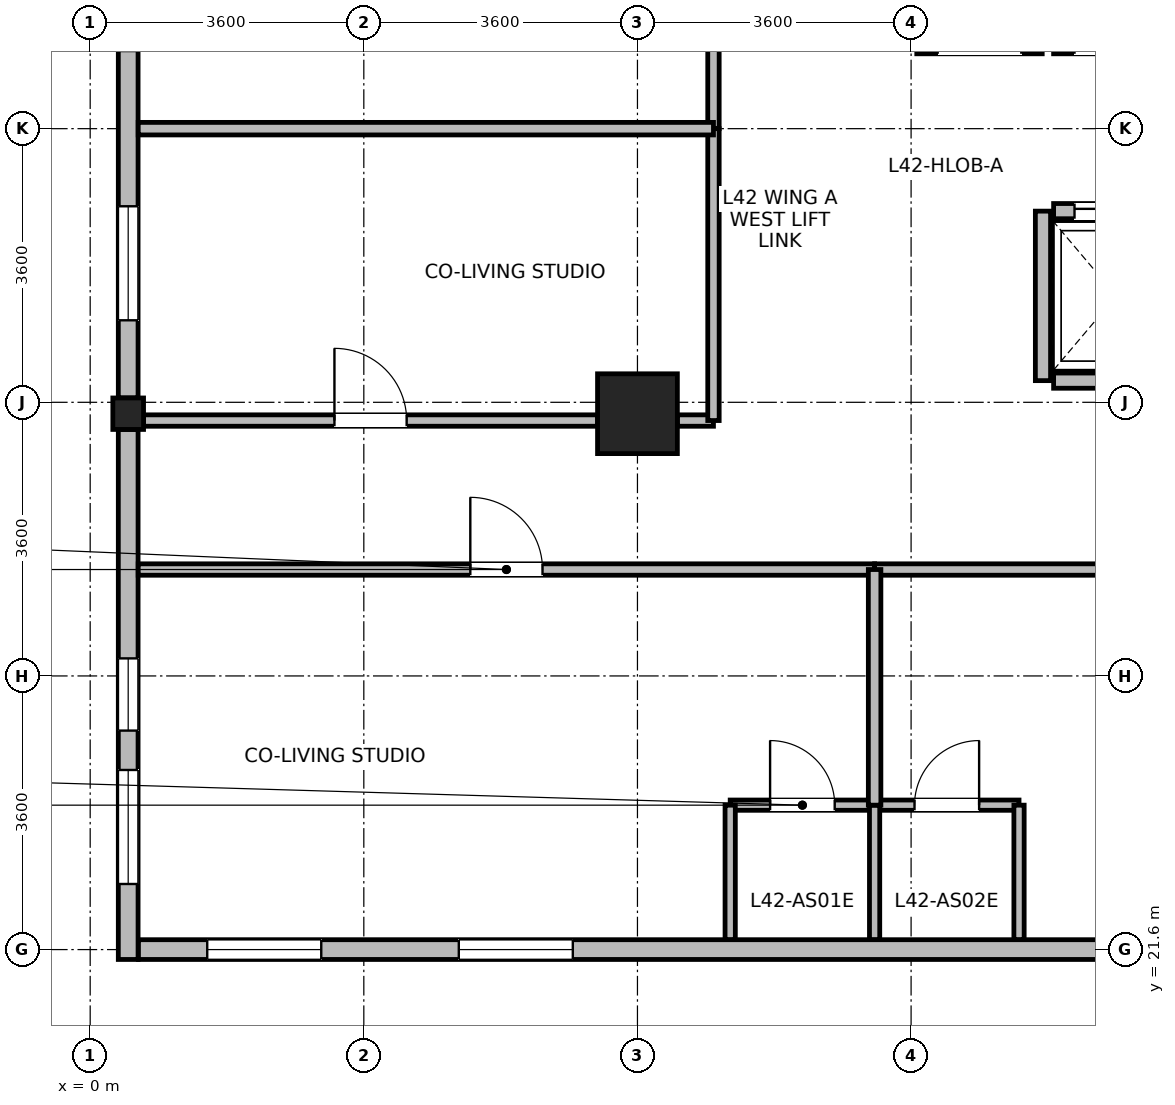
"""IFC4 building model, lengths in metres.
Left out: names, types, materials, properties, quantities, classifications, styles, units other than length and angle.
Written with IfcOpenShell. Run it as: python <this file> out.ifc"""

import sys

from ifc_helpers import new_model, si_unit, direction, frame, frame_2d, origin, origin_2d, place, context, subcontext, project, spatial, rectangle, i_section, extrude, source, transform, mapped, element, fill, save


model = new_model("IFC4")
c1 = context("Model", 3, precision=1e-05, world=origin(), true_north=direction((0.0, 1.0)))
c2 = subcontext(c1, "Body", "Model", "MODEL_VIEW")
j1 = project(units=[si_unit("LENGTHUNIT", "METRE"), si_unit("PLANEANGLEUNIT", "RADIAN")], contexts=[c1])
p1 = place(None, origin())
s1 = spatial("IfcSite", under=j1, at=p1, CompositionType="ELEMENT")
p2 = place(p1, origin())
s2 = spatial("IfcBuilding", under=s1, at=p2, CompositionType="ELEMENT")
p3 = place(p2, frame((0.0, 0.0, 166.1)))
s3 = spatial("IfcBuildingStorey", under=s2, at=p3, CompositionType="ELEMENT", Elevation=166.1)
m1 = source(origin(), c2, "Body", "SweptSolid", [
    extrude(rectangle(XDim=1.05, YDim=1.05, at=origin_2d()), origin(), (0.0, 0.0, 1.0), 3.7),
])
p4 = place(p3, frame((7.2, 28.65, 0.0), z_axis=(0.0, 0.0, 1.0), x_axis=(1.0, 0.0, 0.0)))
e1 = element("IfcColumn", 1, at=p4, inside=s3, PredefinedType="COLUMN", context=c2, shape_type="MappedRepresentation", body=[
    mapped(m1, transform((0.0, 0.0, 0.0), x_axis=(1.0, 0.0, 0.0), y_axis=(0.0, 1.0, 0.0), z_axis=(0.0, 0.0, 1.0), scale=1.0)),
])
m2 = source(origin(), c2, "Body", "SweptSolid", [
    extrude(i_section(OverallWidth=0.404, OverallDepth=0.414, WebThickness=0.021, FlangeThickness=0.028, FilletRadius=0.015, at=origin_2d()), origin(), (0.0, 0.0, 1.0), 3.7),
])
p5 = place(p3, frame((0.5, 28.65, 0.0), z_axis=(0.0, 0.0, 1.0), x_axis=(1.0, 0.0, 0.0)))
e2 = element("IfcColumn", 2, at=p5, inside=s3, PredefinedType="COLUMN", context=c2, shape_type="MappedRepresentation", body=[
    mapped(m2, transform((0.0, 0.0, 0.0), x_axis=(1.0, 0.0, 0.0), y_axis=(0.0, 1.0, 0.0), z_axis=(0.0, 0.0, 1.0), scale=1.0)),
])
p6 = place(p3, frame((0.5, 28.858, 0.0), z_axis=(0.0, 0.0, 1.0), x_axis=(0.0, 1.0, 0.0)))
e3 = element("IfcWall", 3, at=p6, inside=s3, PredefinedType="STANDARD", context=c2, shape_type="SweptSolid", body=[
    extrude(rectangle(XDim=7.084, YDim=0.26, at=frame_2d((3.542, 0.0))), origin(), (0.0, 0.0, 1.0), 2.99),
])
p7 = place(p6, frame((1.021, 0.0, 0.85)))
e4 = element("IfcOpeningElement", 4, at=p7, cuts=e3, PredefinedType="OPENING", context=c2, shape_type="SweptSolid", body=[
    extrude(rectangle(XDim=1.5, YDim=1.85, at=frame_2d((0.75, 0.925))), frame((0.0, 0.14, 0.0), z_axis=(0.0, -1.0, 0.0), x_axis=(1.0, 0.0, 0.0)), (0.0, 0.0, 1.0), 0.28),
])
p8 = place(p6, frame((4.563, 0.0, 0.85)))
e5 = element("IfcOpeningElement", 5, at=p8, cuts=e3, PredefinedType="OPENING", context=c2, shape_type="SweptSolid", body=[
    extrude(rectangle(XDim=1.5, YDim=1.85, at=frame_2d((0.75, 0.925))), frame((0.0, 0.14, 0.0), z_axis=(0.0, -1.0, 0.0), x_axis=(1.0, 0.0, 0.0)), (0.0, 0.0, 1.0), 0.28),
])
p9 = place(p3, frame((0.5, 21.47, 0.0), z_axis=(0.0, 0.0, 1.0), x_axis=(0.0, 1.0, 0.0)))
e6 = element("IfcWall", 6, at=p9, inside=s3, PredefinedType="STANDARD", context=c2, shape_type="SweptSolid", body=[
    extrude(rectangle(XDim=6.972, YDim=0.26, at=frame_2d((3.486, 0.0))), origin(), (0.0, 0.0, 1.0), 3.44),
])
p10 = place(p9, frame((0.993, 0.0, 0.85)))
e7 = element("IfcOpeningElement", 7, at=p10, cuts=e6, PredefinedType="OPENING", context=c2, shape_type="SweptSolid", body=[
    extrude(rectangle(XDim=1.5, YDim=1.85, at=frame_2d((0.75, 0.925))), frame((0.0, 0.14, 0.0), z_axis=(0.0, -1.0, 0.0), x_axis=(1.0, 0.0, 0.0)), (0.0, 0.0, 1.0), 0.28),
])
p11 = place(p9, frame((3.011, 0.0, 0.85)))
e8 = element("IfcOpeningElement", 8, at=p11, cuts=e6, PredefinedType="OPENING", context=c2, shape_type="SweptSolid", body=[
    extrude(rectangle(XDim=0.95, YDim=1.75, at=frame_2d((0.475, 0.875))), frame((0.0, 0.14, 0.0), z_axis=(0.0, -1.0, 0.0), x_axis=(1.0, 0.0, 0.0)), (0.0, 0.0, 1.0), 0.28),
])
p12 = place(p3, frame((13.874, 21.6, 0.0), z_axis=(0.0, 0.0, 1.0), x_axis=(-1.0, 0.0, 0.0)))
e9 = element("IfcWall", 9, at=p12, inside=s3, PredefinedType="STANDARD", context=c2, shape_type="SweptSolid", body=[
    extrude(rectangle(XDim=13.239, YDim=0.26, at=frame_2d((6.62, 0.0))), origin(), (0.0, 0.0, 1.0), 3.44),
])
p13 = place(p12, frame((7.524, 0.0, 0.85)))
e10 = element("IfcOpeningElement", 10, at=p13, cuts=e9, PredefinedType="OPENING", context=c2, shape_type="SweptSolid", body=[
    extrude(rectangle(XDim=1.5, YDim=1.85, at=frame_2d((0.75, 0.925))), frame((0.0, 0.14, 0.0), z_axis=(0.0, -1.0, 0.0), x_axis=(1.0, 0.0, 0.0)), (0.0, 0.0, 1.0), 0.28),
])
p14 = place(p12, frame((10.834, 0.0, 0.85)))
e11 = element("IfcOpeningElement", 11, at=p14, cuts=e9, PredefinedType="OPENING", context=c2, shape_type="SweptSolid", body=[
    extrude(rectangle(XDim=1.5, YDim=1.85, at=frame_2d((0.75, 0.925))), frame((0.0, 0.14, 0.0), z_axis=(0.0, -1.0, 0.0), x_axis=(1.0, 0.0, 0.0)), (0.0, 0.0, 1.0), 0.28),
])
p15 = place(p3, frame((12.675, 33.485, 0.0), z_axis=(0.0, 0.0, 1.0), x_axis=(1.0, 0.0, 0.0)))
e12 = element("IfcWall", 12, at=p15, inside=s3, PredefinedType="PARTITIONING", context=c2, shape_type="SweptSolid", body=[
    extrude(rectangle(XDim=1.65, YDim=0.2, at=frame_2d((0.825, 0.0))), origin(), (0.0, 0.0, 1.0), 3.44),
])
p16 = place(p15, frame((0.275, 0.0, 0.0)))
e13 = element("IfcOpeningElement", 13, at=p16, cuts=e12, PredefinedType="OPENING", context=c2, shape_type="SweptSolid", body=[
    extrude(rectangle(XDim=1.1, YDim=2.12, at=frame_2d((0.55, 1.06))), frame((0.0, 0.11, 0.0), z_axis=(0.0, -1.0, 0.0), x_axis=(1.0, 0.0, 0.0)), (0.0, 0.0, 1.0), 0.22),
])
p17 = place(p3, frame((12.675, 29.085, 0.0), z_axis=(0.0, 0.0, 1.0), x_axis=(1.0, 0.0, 0.0)))
e14 = element("IfcWall", 14, at=p17, inside=s3, PredefinedType="PARTITIONING", context=c2, shape_type="SweptSolid", body=[
    extrude(rectangle(XDim=1.65, YDim=0.2, at=frame_2d((0.825, 0.0))), origin(), (0.0, 0.0, 1.0), 3.44),
])
p18 = place(p3, frame((12.675, 31.315, 0.0), z_axis=(0.0, 0.0, 1.0), x_axis=(1.0, 0.0, 0.0)))
e15 = element("IfcWall", 15, at=p18, inside=s3, PredefinedType="PARTITIONING", context=c2, shape_type="SweptSolid", body=[
    extrude(rectangle(XDim=1.65, YDim=0.2, at=frame_2d((0.825, 0.0))), origin(), (0.0, 0.0, 1.0), 3.44),
])
p19 = place(p18, frame((0.275, 0.0, 0.0)))
e16 = element("IfcOpeningElement", 16, at=p19, cuts=e15, PredefinedType="OPENING", context=c2, shape_type="SweptSolid", body=[
    extrude(rectangle(XDim=1.1, YDim=2.12, at=frame_2d((0.55, 1.06))), frame((0.0, 0.11, 0.0), z_axis=(0.0, -1.0, 0.0), x_axis=(1.0, 0.0, 0.0)), (0.0, 0.0, 1.0), 0.22),
])
p20 = place(p3, frame((12.535, 29.085, 0.0), z_axis=(0.0, 0.0, 1.0), x_axis=(0.0, 1.0, 0.0)))
e17 = element("IfcWall", 17, at=p20, inside=s3, PredefinedType="PARTITIONING", context=c2, shape_type="SweptSolid", body=[
    extrude(rectangle(XDim=2.23, YDim=0.2, at=frame_2d((1.115, 0.0))), origin(), (0.0, 0.0, 1.0), 3.44),
])
p21 = place(p3, frame((10.875, 33.485, 0.0), z_axis=(0.0, 0.0, 1.0), x_axis=(1.0, 0.0, 0.0)))
e18 = element("IfcWall", 18, at=p21, inside=s3, PredefinedType="PARTITIONING", context=c2, shape_type="SweptSolid", body=[
    extrude(rectangle(XDim=1.65, YDim=0.2, at=frame_2d((0.825, 0.0))), origin(), (0.0, 0.0, 1.0), 3.44),
])
p22 = place(p21, frame((0.275, 0.0, 0.0)))
e19 = element("IfcOpeningElement", 19, at=p22, cuts=e18, PredefinedType="OPENING", context=c2, shape_type="SweptSolid", body=[
    extrude(rectangle(XDim=1.1, YDim=2.12, at=frame_2d((0.55, 1.06))), frame((0.0, 0.11, 0.0), z_axis=(0.0, -1.0, 0.0), x_axis=(1.0, 0.0, 0.0)), (0.0, 0.0, 1.0), 0.22),
])
p23 = place(p3, frame((8.42, 23.5, 0.0), z_axis=(0.0, 0.0, 1.0), x_axis=(1.0, 0.0, 0.0)))
e20 = element("IfcWall", 20, at=p23, inside=s3, PredefinedType="PARTITIONING", context=c2, shape_type="SweptSolid", body=[
    extrude(rectangle(XDim=1.9, YDim=0.135, at=frame_2d((0.95, 0.0))), origin(), (0.0, 0.0, 1.0), 3.44),
])
p24 = place(p23, frame((0.525, 0.0, 0.0)))
e21 = element("IfcOpeningElement", 21, at=p24, cuts=e20, PredefinedType="OPENING", context=c2, shape_type="SweptSolid", body=[
    extrude(rectangle(XDim=0.85, YDim=2.04, at=frame_2d((0.425, 1.02))), frame((0.0, 0.078, 0.0), z_axis=(0.0, -1.0, 0.0), x_axis=(1.0, 0.0, 0.0)), (0.0, 0.0, 1.0), 0.155),
])
p25 = place(p3, frame((10.32, 23.5, 0.0), z_axis=(0.0, 0.0, 1.0), x_axis=(1.0, 0.0, 0.0)))
e22 = element("IfcWall", 22, at=p25, inside=s3, PredefinedType="PARTITIONING", context=c2, shape_type="SweptSolid", body=[
    extrude(rectangle(XDim=1.9, YDim=0.135, at=frame_2d((0.95, 0.0))), origin(), (0.0, 0.0, 1.0), 3.44),
])
p26 = place(p25, frame((0.525, 0.0, 0.0)))
e23 = element("IfcOpeningElement", 23, at=p26, cuts=e22, PredefinedType="OPENING", context=c2, shape_type="SweptSolid", body=[
    extrude(rectangle(XDim=0.85, YDim=2.04, at=frame_2d((0.425, 1.02))), frame((0.0, 0.078, 0.0), z_axis=(0.0, -1.0, 0.0), x_axis=(1.0, 0.0, 0.0)), (0.0, 0.0, 1.0), 0.155),
])
for number, where, z_axis, x_axis in (
    (24, (8.42, 21.732, 0.0), (0.0, 0.0, 1.0), (0.0, 1.0, 0.0)),
    (25, (10.32, 21.732, 0.0), (0.0, 0.0, 1.0), (0.0, 1.0, 0.0)),
    (26, (12.22, 21.732, 0.0), (0.0, 0.0, 1.0), (0.0, 1.0, 0.0)),
):
    element("IfcWall", number, at=place(p3, frame(where, z_axis=z_axis, x_axis=x_axis)), inside=s3, PredefinedType="PARTITIONING", context=c2, shape_type="SweptSolid", body=[
        extrude(rectangle(XDim=1.768, YDim=0.135, at=frame_2d((0.884, 0.0))), origin(), (0.0, 0.0, 1.0), 3.44),
    ])
p27 = place(p3, frame((0.632, 26.6, 0.0), z_axis=(0.0, 0.0, 1.0), x_axis=(1.0, 0.0, 0.0)))
e27 = element("IfcWall", 27, at=p27, inside=s3, PredefinedType="PARTITIONING", context=c2, shape_type="SweptSolid", body=[
    extrude(rectangle(XDim=9.688, YDim=0.15, at=frame_2d((4.844, 0.0))), origin(), (0.0, 0.0, 1.0), 3.44),
])
p28 = place(p27, frame((4.369, 0.0, 0.0)))
e28 = element("IfcOpeningElement", 28, at=p28, cuts=e27, PredefinedType="OPENING", context=c2, shape_type="SweptSolid", body=[
    extrude(rectangle(XDim=0.95, YDim=2.1, at=frame_2d((0.475, 1.05))), frame((0.0, 0.085, 0.0), z_axis=(0.0, -1.0, 0.0), x_axis=(1.0, 0.0, 0.0)), (0.0, 0.0, 1.0), 0.17),
])
p29 = place(p3, frame((10.32, 26.6, 0.0), z_axis=(0.0, 0.0, 1.0), x_axis=(1.0, 0.0, 0.0)))
e29 = element("IfcWall", 29, at=p29, inside=s3, PredefinedType="PARTITIONING", context=c2, shape_type="SweptSolid", body=[
    extrude(rectangle(XDim=9.08, YDim=0.15, at=frame_2d((4.54, 0.0))), origin(), (0.0, 0.0, 1.0), 3.44),
])
p30 = place(p29, frame((4.065, 0.0, 0.0)))
e30 = element("IfcOpeningElement", 30, at=p30, cuts=e29, PredefinedType="OPENING", context=c2, shape_type="SweptSolid", body=[
    extrude(rectangle(XDim=0.95, YDim=2.1, at=frame_2d((0.475, 1.05))), frame((0.0, 0.085, 0.0), z_axis=(0.0, -1.0, 0.0), x_axis=(1.0, 0.0, 0.0)), (0.0, 0.0, 1.0), 0.17),
])
p31 = place(p3, frame((0.702, 28.56, 0.0), z_axis=(0.0, 0.0, 1.0), x_axis=(1.0, 0.0, 0.0)))
e31 = element("IfcWall", 31, at=p31, inside=s3, PredefinedType="PARTITIONING", context=c2, shape_type="SweptSolid", body=[
    extrude(rectangle(XDim=5.973, YDim=0.15, at=frame_2d((2.987, 0.0))), origin(), (0.0, 0.0, 1.0), 2.84),
])
p32 = place(p31, frame((2.511, 0.0, 0.0)))
e32 = element("IfcOpeningElement", 32, at=p32, cuts=e31, PredefinedType="OPENING", context=c2, shape_type="SweptSolid", body=[
    extrude(rectangle(XDim=0.95, YDim=2.1, at=frame_2d((0.475, 1.05))), frame((0.0, 0.085, 0.0), z_axis=(0.0, -1.0, 0.0), x_axis=(1.0, 0.0, 0.0)), (0.0, 0.0, 1.0), 0.17),
])
p33 = place(p3, frame((7.725, 28.56, 0.0), z_axis=(0.0, 0.0, 1.0), x_axis=(1.0, 0.0, 0.0)))
e33 = element("IfcWall", 33, at=p33, inside=s3, PredefinedType="PARTITIONING", context=c2, shape_type="SweptSolid", body=[
    extrude(rectangle(XDim=0.475, YDim=0.15, at=frame_2d((0.237, 0.0))), origin(), (0.0, 0.0, 1.0), 2.84),
])
p34 = place(p3, frame((8.2, 32.4, 0.0), z_axis=(0.0, 0.0, 1.0), x_axis=(0.0, 1.0, 0.0)))
e34 = element("IfcWall", 34, at=p34, inside=s3, PredefinedType="PARTITIONING", context=c2, shape_type="SweptSolid", body=[
    extrude(rectangle(XDim=3.84, YDim=0.15, at=frame_2d((1.92, 0.0))), origin(), (0.0, 0.0, 1.0), 3.44),
])
p35 = place(p34, frame((1.27, 0.0, 0.0)))
e35 = element("IfcOpeningElement", 35, at=p35, cuts=e34, PredefinedType="OPENING", context=c2, shape_type="SweptSolid", body=[
    extrude(rectangle(XDim=1.3, YDim=2.12, at=frame_2d((0.65, 1.06))), frame((0.0, 0.085, 0.0), z_axis=(0.0, -1.0, 0.0), x_axis=(1.0, 0.0, 0.0)), (0.0, 0.0, 1.0), 0.17),
])
p36 = place(p3, frame((8.2, 28.56, 0.0), z_axis=(0.0, 0.0, 1.0), x_axis=(0.0, 1.0, 0.0)))
e36 = element("IfcWall", 36, at=p36, inside=s3, PredefinedType="PARTITIONING", context=c2, shape_type="SweptSolid", body=[
    extrude(rectangle(XDim=3.84, YDim=0.15, at=frame_2d((1.92, 0.0))), origin(), (0.0, 0.0, 1.0), 3.44),
])
p37 = place(p3, frame((0.632, 32.4, 0.0), z_axis=(0.0, 0.0, 1.0), x_axis=(1.0, 0.0, 0.0)))
e37 = element("IfcWall", 37, at=p37, inside=s3, PredefinedType="PARTITIONING", context=c2, shape_type="SweptSolid", body=[
    extrude(rectangle(XDim=7.568, YDim=0.165, at=frame_2d((3.784, 0.0))), origin(), (0.0, 0.0, 1.0), 3.44),
])
p38 = place(p3, frame((10.32, 23.5, 0.0), z_axis=(0.0, 0.0, 1.0), x_axis=(0.0, 1.0, 0.0)))
e38 = element("IfcWall", 38, at=p38, inside=s3, PredefinedType="PARTITIONING", context=c2, shape_type="SweptSolid", body=[
    extrude(rectangle(XDim=3.1, YDim=0.165, at=frame_2d((1.55, 0.0))), origin(), (0.0, 0.0, 1.0), 3.44),
])
p39 = place(p7, origin())
e39 = element("IfcWindow", 39, at=p39, inside=s3, PartitioningType="SINGLE_PANEL", PredefinedType="WINDOW", context=c2, shape_type="SweptSolid", body=[
    extrude(rectangle(XDim=1.5, YDim=1.85, at=frame_2d((0.75, 0.925))), frame((0.0, 0.03, 0.0), z_axis=(0.0, -1.0, 0.0), x_axis=(1.0, 0.0, 0.0)), (0.0, 0.0, 1.0), 0.06),
])
fill(e4, e39)
p40 = place(p10, origin())
e40 = element("IfcWindow", 40, at=p40, inside=s3, PartitioningType="SINGLE_PANEL", PredefinedType="WINDOW", context=c2, shape_type="SweptSolid", body=[
    extrude(rectangle(XDim=1.5, YDim=1.85, at=frame_2d((0.75, 0.925))), frame((0.0, 0.03, 0.0), z_axis=(0.0, -1.0, 0.0), x_axis=(1.0, 0.0, 0.0)), (0.0, 0.0, 1.0), 0.06),
])
fill(e7, e40)
p41 = place(p11, origin())
e41 = element("IfcWindow", 41, at=p41, inside=s3, PartitioningType="SINGLE_PANEL", PredefinedType="WINDOW", context=c2, shape_type="SweptSolid", body=[
    extrude(rectangle(XDim=0.95, YDim=1.75, at=frame_2d((0.475, 0.875))), frame((0.0, 0.03, 0.0), z_axis=(0.0, -1.0, 0.0), x_axis=(1.0, 0.0, 0.0)), (0.0, 0.0, 1.0), 0.06),
])
fill(e8, e41)
p42 = place(p13, origin())
e42 = element("IfcWindow", 42, at=p42, inside=s3, PartitioningType="SINGLE_PANEL", PredefinedType="WINDOW", context=c2, shape_type="SweptSolid", body=[
    extrude(rectangle(XDim=1.5, YDim=1.85, at=frame_2d((0.75, 0.925))), frame((0.0, 0.03, 0.0), z_axis=(0.0, -1.0, 0.0), x_axis=(1.0, 0.0, 0.0)), (0.0, 0.0, 1.0), 0.06),
])
fill(e10, e42)
p43 = place(p14, origin())
e43 = element("IfcWindow", 43, at=p43, inside=s3, PartitioningType="SINGLE_PANEL", PredefinedType="WINDOW", context=c2, shape_type="SweptSolid", body=[
    extrude(rectangle(XDim=1.5, YDim=1.85, at=frame_2d((0.75, 0.925))), frame((0.0, 0.03, 0.0), z_axis=(0.0, -1.0, 0.0), x_axis=(1.0, 0.0, 0.0)), (0.0, 0.0, 1.0), 0.06),
])
fill(e11, e43)
p44 = place(p19, origin())
e44 = element("IfcDoor", 44, at=p44, inside=s3, OperationType="SLIDING_TO_LEFT", PredefinedType="DOOR", context=c2, shape_type="SweptSolid", body=[
    extrude(rectangle(XDim=1.1, YDim=2.12, at=frame_2d((0.55, 1.06))), frame((0.0, 0.025, 0.0), z_axis=(0.0, -1.0, 0.0), x_axis=(1.0, 0.0, 0.0)), (0.0, 0.0, 1.0), 0.05),
])
fill(e16, e44)
p45 = place(p24, origin())
e45 = element("IfcDoor", 45, at=p45, inside=s3, OperationType="SINGLE_SWING_LEFT", PredefinedType="DOOR", context=c2, shape_type="SweptSolid", body=[
    extrude(rectangle(XDim=0.85, YDim=2.04, at=frame_2d((0.425, 1.02))), frame((0.0, 0.025, 0.0), z_axis=(0.0, -1.0, 0.0), x_axis=(1.0, 0.0, 0.0)), (0.0, 0.0, 1.0), 0.05),
])
fill(e21, e45)
p46 = place(p26, origin())
e46 = element("IfcDoor", 46, at=p46, inside=s3, OperationType="SINGLE_SWING_RIGHT", PredefinedType="DOOR", context=c2, shape_type="SweptSolid", body=[
    extrude(rectangle(XDim=0.85, YDim=2.04, at=frame_2d((0.425, 1.02))), frame((0.0, 0.025, 0.0), z_axis=(0.0, -1.0, 0.0), x_axis=(1.0, 0.0, 0.0)), (0.0, 0.0, 1.0), 0.05),
])
fill(e23, e46)
p47 = place(p28, origin())
e47 = element("IfcDoor", 47, at=p47, inside=s3, OperationType="SINGLE_SWING_LEFT", PredefinedType="DOOR", context=c2, shape_type="SweptSolid", body=[
    extrude(rectangle(XDim=0.95, YDim=2.1, at=frame_2d((0.475, 1.05))), frame((0.0, 0.025, 0.0), z_axis=(0.0, -1.0, 0.0), x_axis=(1.0, 0.0, 0.0)), (0.0, 0.0, 1.0), 0.05),
])
fill(e28, e47)
p48 = place(p32, origin())
e48 = element("IfcDoor", 48, at=p48, inside=s3, OperationType="SINGLE_SWING_LEFT", PredefinedType="DOOR", context=c2, shape_type="SweptSolid", body=[
    extrude(rectangle(XDim=0.95, YDim=2.1, at=frame_2d((0.475, 1.05))), frame((0.0, 0.025, 0.0), z_axis=(0.0, -1.0, 0.0), x_axis=(1.0, 0.0, 0.0)), (0.0, 0.0, 1.0), 0.05),
])
fill(e32, e48)
save(model, sys.argv[1])
